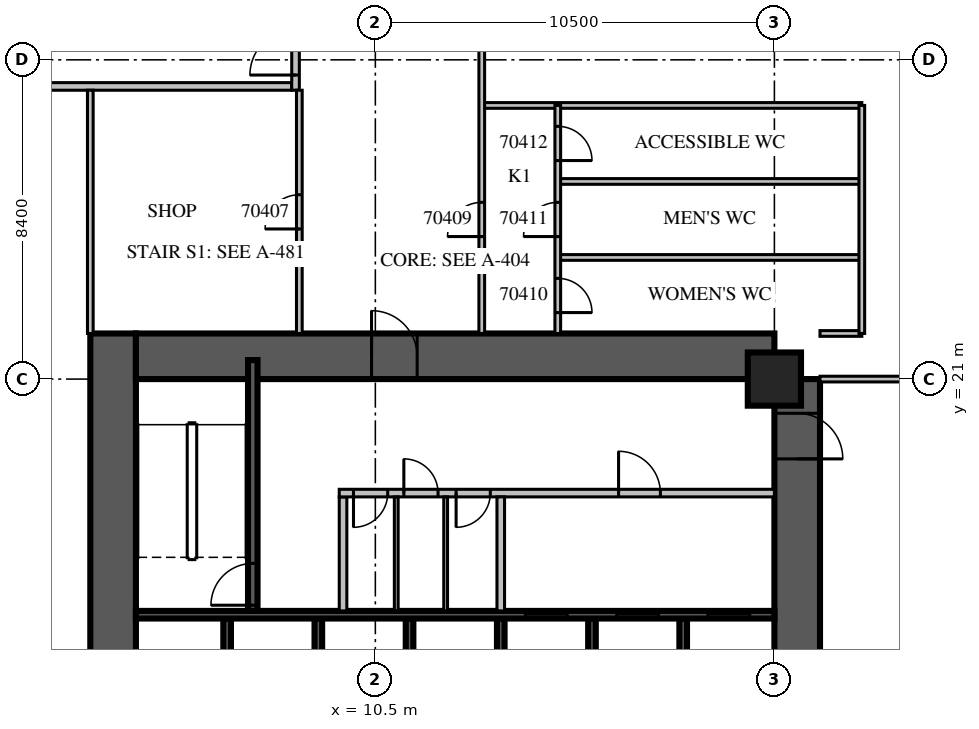
"""IFC4 building model, lengths in metres.
Left out: names, types, materials, properties, quantities, classifications, styles, units other than length and angle.
Written with IfcOpenShell. Run it as: python <this file> out.ifc"""

import sys

from ifc_helpers import new_model, si_unit, direction, frame, frame_2d, origin, origin_2d, place, context, subcontext, project, spatial, rectangle, extrude, source, transform, mapped, element, fill, save


model = new_model("IFC4")
c1 = context("Model", 3, precision=1e-05, world=origin(), true_north=direction((0.0, 1.0)))
c2 = subcontext(c1, "Body", "Model", "MODEL_VIEW")
j1 = project(units=[si_unit("LENGTHUNIT", "METRE"), si_unit("PLANEANGLEUNIT", "RADIAN")], contexts=[c1])
p1 = place(None, origin())
s1 = spatial("IfcSite", under=j1, at=p1, CompositionType="ELEMENT")
p2 = place(p1, origin())
s2 = spatial("IfcBuilding", under=s1, at=p2, CompositionType="ELEMENT")
p3 = place(p2, frame((0.0, 0.0, 7.5)))
s3 = spatial("IfcBuildingStorey", under=s2, at=p3, CompositionType="ELEMENT", Elevation=7.5)
m1 = source(origin(), c2, "Body", "SweptSolid", [
    extrude(rectangle(XDim=1.4, YDim=1.4, at=origin_2d()), origin(), (0.0, 0.0, 1.0), 5.4),
])
p4 = place(p3, frame((21.0, 21.0, 0.0), z_axis=(0.0, 0.0, 1.0), x_axis=(1.0, 0.0, 0.0)))
e1 = element("IfcColumn", 1, at=p4, inside=s3, PredefinedType="COLUMN", context=c2, shape_type="MappedRepresentation", body=[
    mapped(m1, transform((0.0, 0.0, 0.0), scale=1.0)),
])
p5 = place(p3, frame((3.6, 4.2, 0.0), z_axis=(0.0, 0.0, 1.0), x_axis=(0.0, 1.0, 0.0)))
e2 = element("IfcWall", 2, at=p5, inside=s3, PredefinedType="SHEAR", context=c2, shape_type="SweptSolid", body=[
    extrude(rectangle(XDim=18.0, YDim=1.2, at=frame_2d((9.0, 0.0))), origin(), (0.0, 0.0, 1.0), 5.4),
])
m2 = source(origin(), c2, "Body", "SweptSolid", [
    extrude(rectangle(XDim=2.2, YDim=2.1, at=frame_2d((1.1, 1.05))), frame((0.0, 0.61, 0.0), z_axis=(0.0, -1.0, 0.0), x_axis=(1.0, 0.0, 0.0)), (0.0, 0.0, 1.0), 1.22),
])
p6 = place(p5, frame((4.6, 0.0, 0.0)))
e3 = element("IfcOpeningElement", 3, at=p6, cuts=e2, PredefinedType="OPENING", context=c2, shape_type="MappedRepresentation", body=[
    mapped(m2, transform((0.0, 0.0, 0.0), scale=1.0)),
])
p7 = place(p3, frame((21.6, 4.2, 0.0), z_axis=(0.0, 0.0, 1.0), x_axis=(0.0, 1.0, 0.0)))
e4 = element("IfcWall", 4, at=p7, inside=s3, PredefinedType="SHEAR", context=c2, shape_type="SweptSolid", body=[
    extrude(rectangle(XDim=16.8, YDim=1.2, at=frame_2d((8.4, 0.0))), origin(), (0.0, 0.0, 1.0), 5.4),
])
p8 = place(p7, frame((4.2, 0.0, 0.0)))
e5 = element("IfcOpeningElement", 5, at=p8, cuts=e4, PredefinedType="OPENING", context=c2, shape_type="MappedRepresentation", body=[
    mapped(m2, transform((0.0, 0.0, 0.0), scale=1.0)),
])
m3 = source(origin(), c2, "Body", "SweptSolid", [
    extrude(rectangle(XDim=1.2, YDim=2.1, at=frame_2d((0.6, 1.05))), frame((0.0, 0.61, 0.0), z_axis=(0.0, -1.0, 0.0), x_axis=(1.0, 0.0, 0.0)), (0.0, 0.0, 1.0), 1.22),
])
p9 = place(p7, frame((14.7, 0.0, 0.0)))
e6 = element("IfcOpeningElement", 6, at=p9, cuts=e4, PredefinedType="OPENING", context=c2, shape_type="MappedRepresentation", body=[
    mapped(m3, transform((0.0, 0.0, 0.0), scale=1.0)),
])
m4 = source(origin(), c2, "Body", "SweptSolid", [
    extrude(rectangle(XDim=16.8, YDim=1.2, at=frame_2d((8.4, 0.0))), origin(), (0.0, 0.0, 1.0), 5.4),
])
p10 = place(p3, frame((4.2, 21.6, 0.0), z_axis=(0.0, 0.0, 1.0), x_axis=(1.0, 0.0, 0.0)))
e7 = element("IfcWall", 7, at=p10, inside=s3, PredefinedType="SHEAR", context=c2, shape_type="MappedRepresentation", body=[
    mapped(m4, transform((0.0, 0.0, 0.0), scale=1.0)),
])
p11 = place(p10, frame((6.2, 0.0, 0.0)))
e8 = element("IfcOpeningElement", 8, at=p11, cuts=e7, PredefinedType="OPENING", context=c2, shape_type="MappedRepresentation", body=[
    mapped(m3, transform((0.0, 0.0, 0.0), scale=1.0)),
])
p12 = place(p3, frame((6.6, 11.7, 0.0), z_axis=(0.0, 0.0, 1.0), x_axis=(0.0, 1.0, 0.0)))
e9 = element("IfcWall", 9, at=p12, inside=s3, PredefinedType="SOLIDWALL", context=c2, shape_type="SweptSolid", body=[
    extrude(rectangle(XDim=3.0, YDim=0.2, at=frame_2d((1.5, 0.0))), origin(), (0.0, 0.0, 1.0), 5.4),
])
m5 = source(origin(), c2, "Body", "SweptSolid", [
    extrude(rectangle(XDim=3.0, YDim=0.2, at=frame_2d((1.5, 0.0))), origin(), (0.0, 0.0, 1.0), 5.4),
])
for number, where, z_axis, x_axis in (
    (10, (9.0, 11.7, 0.0), (0.0, 0.0, 1.0), (0.0, 1.0, 0.0)),
    (11, (11.4, 11.7, 0.0), (0.0, 0.0, 1.0), (0.0, 1.0, 0.0)),
    (12, (13.8, 11.7, 0.0), (0.0, 0.0, 1.0), (0.0, 1.0, 0.0)),
    (13, (16.2, 11.7, 0.0), (0.0, 0.0, 1.0), (0.0, 1.0, 0.0)),
    (14, (18.6, 11.7, 0.0), (0.0, 0.0, 1.0), (0.0, 1.0, 0.0)),
):
    element("IfcWall", number, at=place(p3, frame(where, z_axis=z_axis, x_axis=x_axis)), inside=s3, PredefinedType="SOLIDWALL", context=c2, shape_type="MappedRepresentation", body=[
        mapped(m5, transform((0.0, 0.0, 0.0), scale=1.0)),
    ])
m6 = source(origin(), c2, "Body", "SweptSolid", [
    extrude(rectangle(XDim=16.8, YDim=0.2, at=frame_2d((8.4, 0.0))), origin(), (0.0, 0.0, 1.0), 5.4),
])
p13 = place(p3, frame((4.2, 14.8, 0.0), z_axis=(0.0, 0.0, 1.0), x_axis=(1.0, 0.0, 0.0)))
e15 = element("IfcWall", 15, at=p13, inside=s3, PredefinedType="SOLIDWALL", context=c2, shape_type="MappedRepresentation", body=[
    mapped(m6, transform((0.0, 0.0, 0.0), scale=1.0)),
])
m7 = source(origin(), c2, "Body", "SweptSolid", [
    extrude(rectangle(XDim=1.1, YDim=2.1, at=frame_2d((0.55, 1.05))), frame((0.0, 0.11, 0.0), z_axis=(0.0, -1.0, 0.0), x_axis=(1.0, 0.0, 0.0)), (0.0, 0.0, 1.0), 0.22),
])
p14 = place(p13, frame((10.25, 0.0, 0.0)))
e16 = element("IfcOpeningElement", 16, at=p14, cuts=e15, PredefinedType="OPENING", context=c2, shape_type="MappedRepresentation", body=[
    mapped(m7, transform((0.0, 0.0, 0.0), scale=1.0)),
])
p15 = place(p13, frame((12.65, 0.0, 0.0)))
e17 = element("IfcOpeningElement", 17, at=p15, cuts=e15, PredefinedType="OPENING", context=c2, shape_type="MappedRepresentation", body=[
    mapped(m7, transform((0.0, 0.0, 0.0), scale=1.0)),
])
p16 = place(p13, frame((15.05, 0.0, 0.0)))
e18 = element("IfcOpeningElement", 18, at=p16, cuts=e15, PredefinedType="OPENING", context=c2, shape_type="MappedRepresentation", body=[
    mapped(m7, transform((0.0, 0.0, 0.0), scale=1.0)),
])
p17 = place(p3, frame((7.275, 14.9, 0.0), z_axis=(0.0, 0.0, 1.0), x_axis=(0.0, 1.0, 0.0)))
e19 = element("IfcWall", 19, at=p17, inside=s3, PredefinedType="SOLIDWALL", context=c2, shape_type="SweptSolid", body=[
    extrude(rectangle(XDim=6.6, YDim=0.25, at=frame_2d((3.3, 0.0))), origin(), (0.0, 0.0, 1.0), 4.8),
])
m8 = source(origin(), c2, "Body", "SweptSolid", [
    extrude(rectangle(XDim=1.1, YDim=2.1, at=frame_2d((0.55, 1.05))), frame((0.0, 0.135, 0.0), z_axis=(0.0, -1.0, 0.0), x_axis=(1.0, 0.0, 0.0)), (0.0, 0.0, 1.0), 0.27),
])
p18 = place(p17, frame((0.15, 0.0, 0.0)))
e20 = element("IfcOpeningElement", 20, at=p18, cuts=e19, PredefinedType="OPENING", context=c2, shape_type="MappedRepresentation", body=[
    mapped(m8, transform((0.0, 0.0, 0.0), scale=1.0)),
])
p19 = place(p3, frame((9.65, 14.9, 0.0), z_axis=(0.0, 0.0, 1.0), x_axis=(0.0, 1.0, 0.0)))
e21 = element("IfcWall", 21, at=p19, inside=s3, PredefinedType="PARTITIONING", context=c2, shape_type="SweptSolid", body=[
    extrude(rectangle(XDim=3.0, YDim=0.2, at=frame_2d((1.5, 0.0))), origin(), (0.0, 0.0, 1.0), 4.8),
])
p20 = place(p3, frame((9.55, 18.0, 0.0), z_axis=(0.0, 0.0, 1.0), x_axis=(1.0, 0.0, 0.0)))
e22 = element("IfcWall", 22, at=p20, inside=s3, PredefinedType="PARTITIONING", context=c2, shape_type="SweptSolid", body=[
    extrude(rectangle(XDim=11.45, YDim=0.2, at=frame_2d((5.725, 0.0))), origin(), (0.0, 0.0, 1.0), 4.8),
])
m9 = source(origin(), c2, "Body", "SweptSolid", [
    extrude(rectangle(XDim=0.9, YDim=2.1, at=frame_2d((0.45, 1.05))), frame((0.0, 0.11, 0.0), z_axis=(0.0, -1.0, 0.0), x_axis=(1.0, 0.0, 0.0)), (0.0, 0.0, 1.0), 0.22),
])
p21 = place(p20, frame((0.375, 0.0, 0.0)))
e23 = element("IfcOpeningElement", 23, at=p21, cuts=e22, PredefinedType="OPENING", context=c2, shape_type="MappedRepresentation", body=[
    mapped(m9, transform((0.0, 0.0, 0.0), scale=1.0)),
])
p22 = place(p20, frame((1.7, 0.0, 0.0)))
e24 = element("IfcOpeningElement", 24, at=p22, cuts=e22, PredefinedType="OPENING", context=c2, shape_type="MappedRepresentation", body=[
    mapped(m9, transform((0.0, 0.0, 0.0), scale=1.0)),
])
p23 = place(p20, frame((3.075, 0.0, 0.0)))
e25 = element("IfcOpeningElement", 25, at=p23, cuts=e22, PredefinedType="OPENING", context=c2, shape_type="MappedRepresentation", body=[
    mapped(m9, transform((0.0, 0.0, 0.0), scale=1.0)),
])
p24 = place(p20, frame((7.35, 0.0, 0.0)))
e26 = element("IfcOpeningElement", 26, at=p24, cuts=e22, PredefinedType="OPENING", context=c2, shape_type="MappedRepresentation", body=[
    mapped(m7, transform((0.0, 0.0, 0.0), scale=1.0)),
])
m10 = source(origin(), c2, "Body", "SweptSolid", [
    extrude(rectangle(XDim=3.0, YDim=0.2, at=frame_2d((1.5, 0.0))), origin(), (0.0, 0.0, 1.0), 4.8),
])
p25 = place(p3, frame((13.8, 14.9, 0.0), z_axis=(0.0, 0.0, 1.0), x_axis=(0.0, 1.0, 0.0)))
e27 = element("IfcWall", 27, at=p25, inside=s3, PredefinedType="PARTITIONING", context=c2, shape_type="MappedRepresentation", body=[
    mapped(m10, transform((0.0, 0.0, 0.0), scale=1.0)),
])
p26 = place(p3, frame((11.05, 14.9, 0.0), z_axis=(0.0, 0.0, 1.0), x_axis=(0.0, 1.0, 0.0)))
e28 = element("IfcWall", 28, at=p26, inside=s3, PredefinedType="PARTITIONING", context=c2, shape_type="SweptSolid", body=[
    extrude(rectangle(XDim=3.0, YDim=0.1, at=frame_2d((1.5, 0.0))), origin(), (0.0, 0.0, 1.0), 4.8),
])
m11 = source(origin(), c2, "Body", "SweptSolid", [
    extrude(rectangle(XDim=3.0, YDim=0.1, at=frame_2d((1.5, 0.0))), origin(), (0.0, 0.0, 1.0), 4.8),
])
p27 = place(p3, frame((12.35, 14.9, 0.0), z_axis=(0.0, 0.0, 1.0), x_axis=(0.0, 1.0, 0.0)))
e29 = element("IfcWall", 29, at=p27, inside=s3, PredefinedType="PARTITIONING", context=c2, shape_type="MappedRepresentation", body=[
    mapped(m11, transform((0.0, 0.0, 0.0), scale=1.0)),
])
m12 = source(origin(), c2, "Body", "SweptSolid", [
    extrude(rectangle(XDim=8.0, YDim=0.2, at=frame_2d((4.0, 0.0))), origin(), (0.0, 0.0, 1.0), 4.8),
])
p28 = place(p3, frame((0.3, 28.7, 0.0), z_axis=(0.0, 0.0, 1.0), x_axis=(1.0, 0.0, 0.0)))
e30 = element("IfcWall", 30, at=p28, inside=s3, PredefinedType="PARTITIONING", context=c2, shape_type="MappedRepresentation", body=[
    mapped(m12, transform((0.0, 0.0, 0.0), scale=1.0)),
])
m13 = source(origin(), c2, "Body", "SweptSolid", [
    extrude(rectangle(XDim=5.45, YDim=0.2, at=frame_2d((2.725, 0.0))), origin(), (0.0, 0.0, 1.0), 4.8),
])
p29 = place(p3, frame((8.4, 28.6, 0.0), z_axis=(0.0, 0.0, 1.0), x_axis=(0.0, 1.0, 0.0)))
e31 = element("IfcWall", 31, at=p29, inside=s3, PredefinedType="PARTITIONING", context=c2, shape_type="MappedRepresentation", body=[
    mapped(m13, transform((0.0, 0.0, 0.0), scale=1.0)),
])
m14 = source(origin(), c2, "Body", "SweptSolid", [
    extrude(rectangle(XDim=1.2, YDim=2.1, at=frame_2d((0.6, 1.05))), frame((0.0, 0.11, 0.0), z_axis=(0.0, -1.0, 0.0), x_axis=(1.0, 0.0, 0.0)), (0.0, 0.0, 1.0), 0.22),
])
p30 = place(p29, frame((0.4, 0.0, 0.0)))
e32 = element("IfcOpeningElement", 32, at=p30, cuts=e31, PredefinedType="OPENING", context=c2, shape_type="MappedRepresentation", body=[
    mapped(m14, transform((0.0, 0.0, 0.0), scale=1.0)),
])
p31 = place(p29, frame((3.25, 0.0, 0.0)))
e33 = element("IfcOpeningElement", 33, at=p31, cuts=e31, PredefinedType="OPENING", context=c2, shape_type="MappedRepresentation", body=[
    mapped(m9, transform((0.0, 0.0, 0.0), scale=1.0)),
])
p32 = place(p3, frame((22.2, 21.0, 0.0), z_axis=(0.0, 0.0, 1.0), x_axis=(1.0, 0.0, 0.0)))
e34 = element("IfcWall", 34, at=p32, inside=s3, PredefinedType="PARTITIONING", context=c2, shape_type="SweptSolid", body=[
    extrude(rectangle(XDim=16.2, YDim=0.15, at=frame_2d((8.1, 0.0))), origin(), (0.0, 0.0, 1.0), 4.8),
])
p33 = place(p3, frame((22.2, 22.2, 0.0), z_axis=(0.0, 0.0, 1.0), x_axis=(1.0, 0.0, 0.0)))
e35 = element("IfcWall", 35, at=p33, inside=s3, PredefinedType="PARTITIONING", context=c2, shape_type="SweptSolid", body=[
    extrude(rectangle(XDim=1.1, YDim=0.15, at=frame_2d((0.55, 0.0))), origin(), (0.0, 0.0, 1.0), 4.8),
])
p34 = place(p3, frame((15.3, 24.2, 0.0), z_axis=(0.0, 0.0, 1.0), x_axis=(1.0, 0.0, 0.0)))
e36 = element("IfcWall", 36, at=p34, inside=s3, PredefinedType="PARTITIONING", context=c2, shape_type="SweptSolid", body=[
    extrude(rectangle(XDim=8.0, YDim=0.15, at=frame_2d((4.0, 0.0))), origin(), (0.0, 0.0, 1.0), 4.8),
])
m15 = source(origin(), c2, "Body", "SweptSolid", [
    extrude(rectangle(XDim=8.0, YDim=0.15, at=frame_2d((4.0, 0.0))), origin(), (0.0, 0.0, 1.0), 4.8),
])
p35 = place(p3, frame((15.3, 26.2, 0.0), z_axis=(0.0, 0.0, 1.0), x_axis=(1.0, 0.0, 0.0)))
e37 = element("IfcWall", 37, at=p35, inside=s3, PredefinedType="PARTITIONING", context=c2, shape_type="MappedRepresentation", body=[
    mapped(m15, transform((0.0, 0.0, 0.0), scale=1.0)),
])
p36 = place(p3, frame((13.3, 28.2, 0.0), z_axis=(0.0, 0.0, 1.0), x_axis=(1.0, 0.0, 0.0)))
e38 = element("IfcWall", 38, at=p36, inside=s3, PredefinedType="PARTITIONING", context=c2, shape_type="SweptSolid", body=[
    extrude(rectangle(XDim=10.0, YDim=0.15, at=frame_2d((5.0, 0.0))), origin(), (0.0, 0.0, 1.0), 4.8),
])
p37 = place(p3, frame((3.0, 22.2, 0.0), z_axis=(0.0, 0.0, 1.0), x_axis=(0.0, 1.0, 0.0)))
e39 = element("IfcWall", 39, at=p37, inside=s3, PredefinedType="PARTITIONING", context=c2, shape_type="SweptSolid", body=[
    extrude(rectangle(XDim=6.4, YDim=0.15, at=frame_2d((3.2, 0.0))), origin(), (0.0, 0.0, 1.0), 4.8),
])
m16 = source(origin(), c2, "Body", "SweptSolid", [
    extrude(rectangle(XDim=6.4, YDim=0.15, at=frame_2d((3.2, 0.0))), origin(), (0.0, 0.0, 1.0), 4.8),
])
p38 = place(p3, frame((8.5, 22.2, 0.0), z_axis=(0.0, 0.0, 1.0), x_axis=(0.0, 1.0, 0.0)))
e40 = element("IfcWall", 40, at=p38, inside=s3, PredefinedType="PARTITIONING", context=c2, shape_type="MappedRepresentation", body=[
    mapped(m16, transform((0.0, 0.0, 0.0), scale=1.0)),
])
m17 = source(origin(), c2, "Body", "SweptSolid", [
    extrude(rectangle(XDim=0.9, YDim=2.1, at=frame_2d((0.45, 1.05))), frame((0.0, 0.085, 0.0), z_axis=(0.0, -1.0, 0.0), x_axis=(1.0, 0.0, 0.0)), (0.0, 0.0, 1.0), 0.17),
])
p39 = place(p38, frame((2.75, 0.0, 0.0)))
e41 = element("IfcOpeningElement", 41, at=p39, cuts=e40, PredefinedType="OPENING", context=c2, shape_type="MappedRepresentation", body=[
    mapped(m17, transform((0.0, 0.0, 0.0), scale=1.0)),
])
p40 = place(p3, frame((13.3, 22.2, 0.0), z_axis=(0.0, 0.0, 1.0), x_axis=(0.0, 1.0, 0.0)))
e42 = element("IfcWall", 42, at=p40, inside=s3, PredefinedType="PARTITIONING", context=c2, shape_type="SweptSolid", body=[
    extrude(rectangle(XDim=20.3, YDim=0.15, at=frame_2d((10.15, 0.0))), origin(), (0.0, 0.0, 1.0), 4.8),
])
p41 = place(p40, frame((2.55, 0.0, 0.0)))
e43 = element("IfcOpeningElement", 43, at=p41, cuts=e42, PredefinedType="OPENING", context=c2, shape_type="MappedRepresentation", body=[
    mapped(m17, transform((0.0, 0.0, 0.0), scale=1.0)),
])
p42 = place(p3, frame((15.3, 22.2, 0.0), z_axis=(0.0, 0.0, 1.0), x_axis=(0.0, 1.0, 0.0)))
e44 = element("IfcWall", 44, at=p42, inside=s3, PredefinedType="PARTITIONING", context=c2, shape_type="SweptSolid", body=[
    extrude(rectangle(XDim=6.0, YDim=0.15, at=frame_2d((3.0, 0.0))), origin(), (0.0, 0.0, 1.0), 4.8),
])
p43 = place(p42, frame((0.55, 0.0, 0.0)))
e45 = element("IfcOpeningElement", 45, at=p43, cuts=e44, PredefinedType="OPENING", context=c2, shape_type="MappedRepresentation", body=[
    mapped(m17, transform((0.0, 0.0, 0.0), scale=1.0)),
])
p44 = place(p42, frame((2.55, 0.0, 0.0)))
e46 = element("IfcOpeningElement", 46, at=p44, cuts=e44, PredefinedType="OPENING", context=c2, shape_type="MappedRepresentation", body=[
    mapped(m17, transform((0.0, 0.0, 0.0), scale=1.0)),
])
p45 = place(p42, frame((4.55, 0.0, 0.0)))
e47 = element("IfcOpeningElement", 47, at=p45, cuts=e44, PredefinedType="OPENING", context=c2, shape_type="MappedRepresentation", body=[
    mapped(m17, transform((0.0, 0.0, 0.0), scale=1.0)),
])
m18 = source(origin(), c2, "Body", "SweptSolid", [
    extrude(rectangle(XDim=6.0, YDim=0.15, at=frame_2d((3.0, 0.0))), origin(), (0.0, 0.0, 1.0), 4.8),
])
p46 = place(p3, frame((23.3, 22.2, 0.0), z_axis=(0.0, 0.0, 1.0), x_axis=(0.0, 1.0, 0.0)))
e48 = element("IfcWall", 48, at=p46, inside=s3, PredefinedType="PARTITIONING", context=c2, shape_type="MappedRepresentation", body=[
    mapped(m18, transform((0.0, 0.0, 0.0), scale=1.0)),
])
m19 = source(origin(), c2, "Body", "SweptSolid", [
    extrude(rectangle(XDim=1.1, YDim=2.1, at=frame_2d((0.55, 1.05))), frame((0.0, 0.025, 0.0), z_axis=(0.0, -1.0, 0.0), x_axis=(1.0, 0.0, 0.0)), (0.0, 0.0, 1.0), 0.05),
])
p47 = place(p14, origin())
e49 = element("IfcDoor", 49, at=p47, inside=s3, OperationType="SLIDING_TO_LEFT", PredefinedType="DOOR", context=c2, shape_type="MappedRepresentation", body=[
    mapped(m19, transform((0.0, 0.0, 0.0), scale=1.0)),
])
fill(e16, e49)
p48 = place(p15, origin())
e50 = element("IfcDoor", 50, at=p48, inside=s3, OperationType="SLIDING_TO_LEFT", PredefinedType="DOOR", context=c2, shape_type="MappedRepresentation", body=[
    mapped(m19, transform((0.0, 0.0, 0.0), scale=1.0)),
])
fill(e17, e50)
p49 = place(p16, origin())
e51 = element("IfcDoor", 51, at=p49, inside=s3, OperationType="SLIDING_TO_LEFT", PredefinedType="DOOR", context=c2, shape_type="MappedRepresentation", body=[
    mapped(m19, transform((0.0, 0.0, 0.0), scale=1.0)),
])
fill(e18, e51)
p50 = place(p18, origin())
e52 = element("IfcDoor", 52, at=p50, inside=s3, OperationType="SINGLE_SWING_LEFT", PredefinedType="DOOR", context=c2, shape_type="MappedRepresentation", body=[
    mapped(m19, transform((0.0, 0.0, 0.0), scale=1.0)),
])
fill(e20, e52)
m20 = source(origin(), c2, "Body", "SweptSolid", [
    extrude(rectangle(XDim=0.9, YDim=2.1, at=frame_2d((0.45, 1.05))), frame((0.0, 0.025, 0.0), z_axis=(0.0, -1.0, 0.0), x_axis=(1.0, 0.0, 0.0)), (0.0, 0.0, 1.0), 0.05),
])
p51 = place(p21, origin())
e53 = element("IfcDoor", 53, at=p51, inside=s3, OperationType="SINGLE_SWING_RIGHT", PredefinedType="DOOR", context=c2, shape_type="MappedRepresentation", body=[
    mapped(m20, transform((0.0, 0.0, 0.0), scale=1.0)),
])
fill(e23, e53)
p52 = place(p22, origin())
e54 = element("IfcDoor", 54, at=p52, inside=s3, OperationType="SINGLE_SWING_LEFT", PredefinedType="DOOR", context=c2, shape_type="MappedRepresentation", body=[
    mapped(m20, transform((0.0, 0.0, 0.0), scale=1.0)),
])
fill(e24, e54)
p53 = place(p23, origin())
e55 = element("IfcDoor", 55, at=p53, inside=s3, OperationType="SINGLE_SWING_RIGHT", PredefinedType="DOOR", context=c2, shape_type="MappedRepresentation", body=[
    mapped(m20, transform((0.0, 0.0, 0.0), scale=1.0)),
])
fill(e25, e55)
p54 = place(p24, origin())
e56 = element("IfcDoor", 56, at=p54, inside=s3, OperationType="SINGLE_SWING_LEFT", PredefinedType="DOOR", context=c2, shape_type="MappedRepresentation", body=[
    mapped(m19, transform((0.0, 0.0, 0.0), scale=1.0)),
])
fill(e26, e56)
m21 = source(origin(), c2, "Body", "SweptSolid", [
    extrude(rectangle(XDim=1.2, YDim=2.1, at=frame_2d((0.6, 1.05))), frame((0.0, 0.025, 0.0), z_axis=(0.0, -1.0, 0.0), x_axis=(1.0, 0.0, 0.0)), (0.0, 0.0, 1.0), 0.05),
])
p55 = place(p30, origin())
e57 = element("IfcDoor", 57, at=p55, inside=s3, OperationType="SINGLE_SWING_LEFT", PredefinedType="DOOR", context=c2, shape_type="MappedRepresentation", body=[
    mapped(m21, transform((0.0, 0.0, 0.0), scale=1.0)),
])
fill(e32, e57)
p56 = place(p11, origin())
e58 = element("IfcDoor", 58, at=p56, inside=s3, OperationType="SINGLE_SWING_LEFT", PredefinedType="DOOR", context=c2, shape_type="MappedRepresentation", body=[
    mapped(m21, transform((0.0, 0.0, 0.0), scale=1.0)),
])
fill(e8, e58)
p57 = place(p9, origin())
e59 = element("IfcDoor", 59, at=p57, inside=s3, OperationType="SINGLE_SWING_RIGHT", PredefinedType="DOOR", context=c2, shape_type="MappedRepresentation", body=[
    mapped(m21, transform((0.0, 0.0, 0.0), scale=1.0)),
])
fill(e6, e59)
p58 = place(p39, origin())
e60 = element("IfcDoor", 60, at=p58, inside=s3, OperationType="SINGLE_SWING_LEFT", PredefinedType="DOOR", context=c2, shape_type="MappedRepresentation", body=[
    mapped(m20, transform((0.0, 0.0, 0.0), scale=1.0)),
])
fill(e41, e60)
p59 = place(p41, origin())
e61 = element("IfcDoor", 61, at=p59, inside=s3, OperationType="SINGLE_SWING_LEFT", PredefinedType="DOOR", context=c2, shape_type="MappedRepresentation", body=[
    mapped(m20, transform((0.0, 0.0, 0.0), scale=1.0)),
])
fill(e43, e61)
p60 = place(p43, origin())
e62 = element("IfcDoor", 62, at=p60, inside=s3, OperationType="SINGLE_SWING_RIGHT", PredefinedType="DOOR", context=c2, shape_type="MappedRepresentation", body=[
    mapped(m20, transform((0.0, 0.0, 0.0), scale=1.0)),
])
fill(e45, e62)
p61 = place(p44, origin())
e63 = element("IfcDoor", 63, at=p61, inside=s3, OperationType="SINGLE_SWING_LEFT", PredefinedType="DOOR", context=c2, shape_type="MappedRepresentation", body=[
    mapped(m20, transform((0.0, 0.0, 0.0), scale=1.0)),
])
fill(e46, e63)
p62 = place(p45, origin())
e64 = element("IfcDoor", 64, at=p62, inside=s3, OperationType="SINGLE_SWING_RIGHT", PredefinedType="DOOR", context=c2, shape_type="MappedRepresentation", body=[
    mapped(m20, transform((0.0, 0.0, 0.0), scale=1.0)),
])
fill(e47, e64)
save(model, sys.argv[1])
